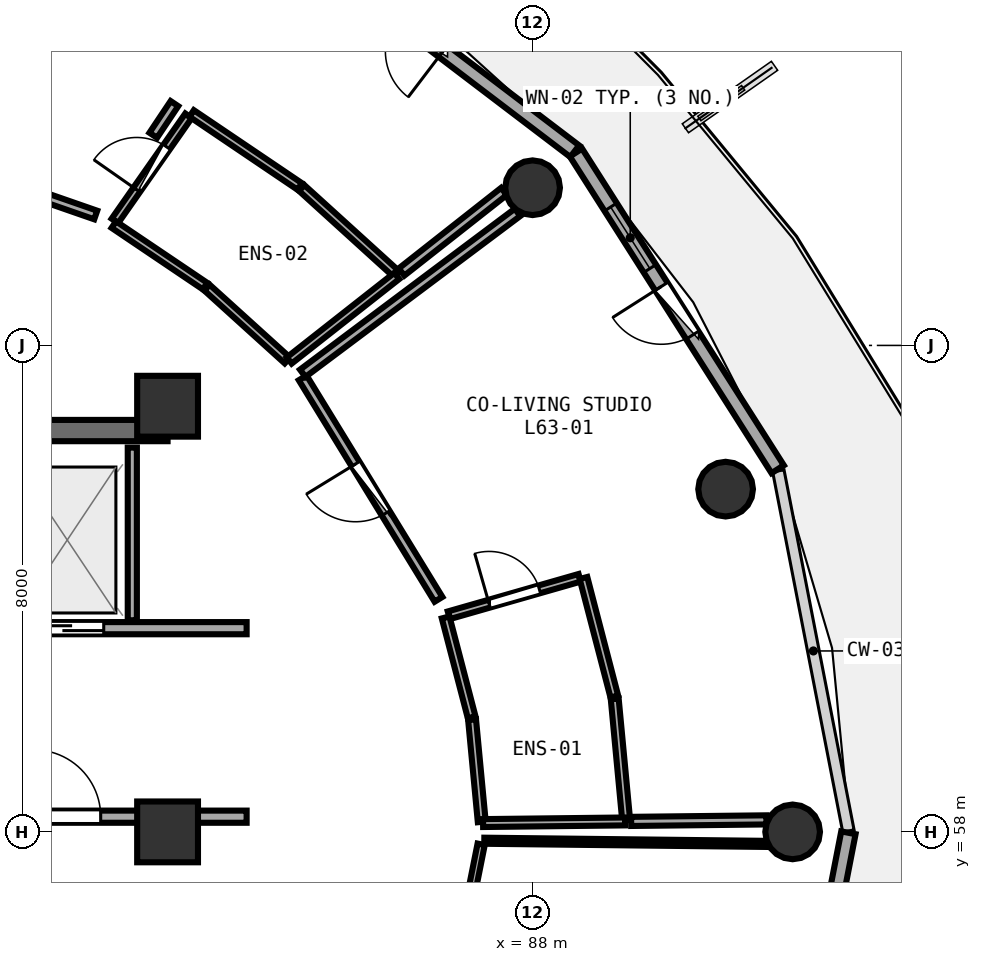
"""IFC4 building model, lengths in metres.
Left out: names, types, materials, properties, quantities, classifications, styles, units other than length and angle.
Written with IfcOpenShell. Run it as: python <this file> out.ifc"""

import sys

from ifc_helpers import new_model, si_unit, direction, frame, frame_2d, origin, origin_2d, place, context, subcontext, project, spatial, rectangle, circle, extrude, element, fill, save


model = new_model("IFC4")
c1 = context("Model", 3, precision=1e-05, world=origin(), true_north=direction((0.0, 1.0)))
c2 = subcontext(c1, "Body", "Model", "MODEL_VIEW")
j1 = project(units=[si_unit("LENGTHUNIT", "METRE"), si_unit("PLANEANGLEUNIT", "RADIAN")], contexts=[c1])
p1 = place(None, origin())
s1 = spatial("IfcSite", under=j1, at=p1, CompositionType="ELEMENT")
p2 = place(p1, origin())
s2 = spatial("IfcBuilding", under=s1, at=p2, CompositionType="ELEMENT")
p3 = place(p2, frame((0.0, 0.0, 248.7)))
s3 = spatial("IfcBuildingStorey", under=s2, at=p3, CompositionType="ELEMENT", Elevation=248.7)
for number, where, z_axis, x_axis in (
    (1, (82.0, 58.0, 0.0), (0.0, 0.0, 1.0), (1.0, 0.0, 0.0)),
    (2, (82.0, 65.0, 0.0), (0.0, 0.0, 1.0), (1.0, 0.0, 0.0)),
):
    element("IfcColumn", number, at=place(p3, frame(where, z_axis=z_axis, x_axis=x_axis)), inside=s3, PredefinedType="PILASTER", context=c2, shape_type="SweptSolid", body=[
        extrude(rectangle(XDim=1.0, YDim=1.0, at=origin_2d()), origin(), (0.0, 0.0, 1.0), 3.75),
    ])
for number, where, z_axis, x_axis in (
    (3, (92.28, 58.0, 0.0), (0.0, 0.0, 1.0), (1.0, 0.0, 0.0)),
    (4, (91.177, 63.636, 0.0), (0.0, 0.0, 1.0), (1.0, 0.0, 0.0)),
    (5, (88.003, 68.593, 0.0), (0.0, 0.0, 1.0), (1.0, 0.0, 0.0)),
):
    element("IfcColumn", number, at=place(p3, frame(where, z_axis=z_axis, x_axis=x_axis)), inside=s3, PredefinedType="COLUMN", context=c2, shape_type="SweptSolid", body=[
        extrude(circle(Radius=0.45, at=origin_2d()), origin(), (0.0, 0.0, 1.0), 3.75),
    ])
p4 = place(p3, frame((92.034, 63.964, 0.0), z_axis=(0.0, 0.0, 1.0), x_axis=(-0.537271968456, 0.843409053728, 0.0)))
e6 = element("IfcWall", 6, at=p4, inside=s3, PredefinedType="SOLIDWALL", context=c2, shape_type="SweptSolid", body=[
    extrude(rectangle(XDim=6.175, YDim=0.24, at=frame_2d((3.087, 0.0))), origin(), (0.0, 0.0, 1.0), 3.475),
])
p5 = place(p4, frame((2.613, 0.0, 0.0)))
e7 = element("IfcOpeningElement", 7, at=p5, cuts=e6, PredefinedType="OPENING", context=c2, shape_type="SweptSolid", body=[
    extrude(rectangle(XDim=0.95, YDim=2.1, at=frame_2d((0.475, 1.05))), frame((0.0, 0.13, 0.0), z_axis=(0.0, -1.0, 0.0), x_axis=(1.0, 0.0, 0.0)), (0.0, 0.0, 1.0), 0.26),
])
p6 = place(p4, frame((3.913, 0.0, 0.85)))
e8 = element("IfcOpeningElement", 8, at=p6, cuts=e6, PredefinedType="OPENING", context=c2, shape_type="SweptSolid", body=[
    extrude(rectangle(XDim=1.2, YDim=1.45, at=frame_2d((0.6, 0.725))), frame((0.0, 0.13, 0.0), z_axis=(0.0, -1.0, 0.0), x_axis=(1.0, 0.0, 0.0)), (0.0, 0.0, 1.0), 0.26),
])
p7 = place(p3, frame((88.696, 69.194, 0.0), z_axis=(0.0, 0.0, 1.0), x_axis=(-0.796010444211, 0.605282886514, 0.0)))
e9 = element("IfcWall", 9, at=p7, inside=s3, PredefinedType="SOLIDWALL", context=c2, shape_type="SweptSolid", body=[
    extrude(rectangle(XDim=6.387, YDim=0.24, at=frame_2d((3.194, 0.0))), origin(), (0.0, 0.0, 1.0), 3.475),
])
p8 = place(p7, frame((2.719, 0.0, 0.0)))
e10 = element("IfcOpeningElement", 10, at=p8, cuts=e9, PredefinedType="OPENING", context=c2, shape_type="SweptSolid", body=[
    extrude(rectangle(XDim=0.95, YDim=2.1, at=frame_2d((0.475, 1.05))), frame((0.0, 0.13, 0.0), z_axis=(0.0, -1.0, 0.0), x_axis=(1.0, 0.0, 0.0)), (0.0, 0.0, 1.0), 0.26),
])
p9 = place(p7, frame((4.019, 0.0, 0.85)))
e11 = element("IfcOpeningElement", 11, at=p9, cuts=e9, PredefinedType="OPENING", context=c2, shape_type="SweptSolid", body=[
    extrude(rectangle(XDim=1.2, YDim=1.45, at=frame_2d((0.6, 0.725))), frame((0.0, 0.13, 0.0), z_axis=(0.0, -1.0, 0.0), x_axis=(1.0, 0.0, 0.0)), (0.0, 0.0, 1.0), 0.26),
])
p10 = place(p3, frame((92.045, 52.063, 0.0), z_axis=(0.0, 0.0, 1.0), x_axis=(0.190969309115, 0.981596008028, 0.0)))
e12 = element("IfcWall", 12, at=p10, inside=s3, PredefinedType="SOLIDWALL", context=c2, shape_type="SweptSolid", body=[
    extrude(rectangle(XDim=6.033, YDim=0.24, at=frame_2d((3.017, 0.0))), origin(), (0.0, 0.0, 1.0), 3.475),
])
p11 = place(p10, frame((2.216, 0.0, 0.85)))
e13 = element("IfcOpeningElement", 13, at=p11, cuts=e12, PredefinedType="OPENING", context=c2, shape_type="SweptSolid", body=[
    extrude(rectangle(XDim=1.6, YDim=1.45, at=frame_2d((0.8, 0.725))), frame((0.0, 0.13, 0.0), z_axis=(0.0, -1.0, 0.0), x_axis=(1.0, 0.0, 0.0)), (0.0, 0.0, 1.0), 0.26),
])
p12 = place(p3, frame((74.0, 64.6, 0.0), z_axis=(0.0, 0.0, 1.0), x_axis=(1.0, 0.0, 0.0)))
e14 = element("IfcWall", 14, at=p12, inside=s3, PredefinedType="SHEAR", context=c2, shape_type="SweptSolid", body=[
    extrude(rectangle(XDim=8.0, YDim=0.35, at=frame_2d((4.0, 0.0))), origin(), (0.0, 0.0, 1.0), 3.49),
])
p13 = place(p3, frame((79.3, 61.35, 0.0), z_axis=(0.0, 0.0, 1.0), x_axis=(1.0, 0.0, 0.0)))
e15 = element("IfcWall", 15, at=p13, inside=s3, PredefinedType="SOLIDWALL", context=c2, shape_type="SweptSolid", body=[
    extrude(rectangle(XDim=4.0, YDim=0.2, at=frame_2d((2.0, 0.0))), origin(), (0.0, 0.0, 1.0), 2.775),
])
p14 = place(p13, frame((0.45, 0.0, 0.0)))
e16 = element("IfcOpeningElement", 16, at=p14, cuts=e15, PredefinedType="OPENING", context=c2, shape_type="SweptSolid", body=[
    extrude(rectangle(XDim=1.2, YDim=2.15, at=frame_2d((0.6, 1.075))), frame((0.0, 0.11, 0.0), z_axis=(0.0, -1.0, 0.0), x_axis=(1.0, 0.0, 0.0)), (0.0, 0.0, 1.0), 0.22),
])
p15 = place(p3, frame((81.42, 61.48, 0.0), z_axis=(0.0, 0.0, 1.0), x_axis=(0.0, 1.0, 0.0)))
e17 = element("IfcWall", 17, at=p15, inside=s3, PredefinedType="PARTITIONING", context=c2, shape_type="SweptSolid", body=[
    extrude(rectangle(XDim=2.84, YDim=0.15, at=frame_2d((1.42, 0.0))), origin(), (0.0, 0.0, 1.0), 3.48),
])
p16 = place(p3, frame((79.3, 58.25, 0.0), z_axis=(0.0, 0.0, 1.0), x_axis=(1.0, 0.0, 0.0)))
e18 = element("IfcWall", 18, at=p16, inside=s3, PredefinedType="SOLIDWALL", context=c2, shape_type="SweptSolid", body=[
    extrude(rectangle(XDim=4.0, YDim=0.2, at=frame_2d((2.0, 0.0))), origin(), (0.0, 0.0, 1.0), 2.775),
])
p17 = place(p16, frame((0.5, 0.0, 0.0)))
e19 = element("IfcOpeningElement", 19, at=p17, cuts=e18, PredefinedType="OPENING", context=c2, shape_type="SweptSolid", body=[
    extrude(rectangle(XDim=1.1, YDim=2.1, at=frame_2d((0.55, 1.05))), frame((0.0, 0.11, 0.0), z_axis=(0.0, -1.0, 0.0), x_axis=(1.0, 0.0, 0.0)), (0.0, 0.0, 1.0), 0.22),
])
p18 = place(p3, frame((86.626, 61.562, 0.0), z_axis=(0.0, 0.0, 1.0), x_axis=(0.961379738838, 0.275225358117, 0.0)))
e20 = element("IfcWall", 20, at=p18, inside=s3, PredefinedType="PLUMBINGWALL", context=c2, shape_type="SweptSolid", body=[
    extrude(rectangle(XDim=2.238, YDim=0.13, at=frame_2d((1.119, 0.0))), origin(), (0.0, 0.0, 1.0), 3.175),
])
p19 = place(p18, frame((0.689, 0.0, 0.0)))
e21 = element("IfcOpeningElement", 21, at=p19, cuts=e20, PredefinedType="OPENING", context=c2, shape_type="SweptSolid", body=[
    extrude(rectangle(XDim=0.86, YDim=2.05, at=frame_2d((0.43, 1.025))), frame((0.0, 0.075, 0.0), z_axis=(0.0, -1.0, 0.0), x_axis=(1.0, 0.0, 0.0)), (0.0, 0.0, 1.0), 0.15),
])
p20 = place(p3, frame((86.456, 61.824, 0.0), z_axis=(0.0, 0.0, 1.0), x_axis=(-0.522665227064, 0.852538011128, 0.0)))
e22 = element("IfcWall", 22, at=p20, inside=s3, PredefinedType="PARTITIONING", context=c2, shape_type="SweptSolid", body=[
    extrude(rectangle(XDim=4.273, YDim=0.15, at=frame_2d((2.136, 0.0))), origin(), (0.0, 0.0, 1.0), 3.075),
])
p21 = place(p20, frame((1.661, 0.0, 0.0)))
e23 = element("IfcOpeningElement", 23, at=p21, cuts=e22, PredefinedType="OPENING", context=c2, shape_type="SweptSolid", body=[
    extrude(rectangle(XDim=0.95, YDim=2.08, at=frame_2d((0.475, 1.04))), frame((0.0, 0.085, 0.0), z_axis=(0.0, -1.0, 0.0), x_axis=(1.0, 0.0, 0.0)), (0.0, 0.0, 1.0), 0.17),
])
p22 = place(p3, frame((81.133, 68.047, 0.0), z_axis=(0.0, 0.0, 1.0), x_axis=(0.573578732096, 0.819150436787, 0.0)))
e24 = element("IfcWall", 24, at=p22, inside=s3, PredefinedType="PLUMBINGWALL", context=c2, shape_type="SweptSolid", body=[
    extrude(rectangle(XDim=2.112, YDim=0.13, at=frame_2d((1.056, 0.0))), origin(), (0.0, 0.0, 1.0), 3.175),
])
p23 = place(p22, frame((0.626, 0.0, 0.0)))
e25 = element("IfcOpeningElement", 25, at=p23, cuts=e24, PredefinedType="OPENING", context=c2, shape_type="SweptSolid", body=[
    extrude(rectangle(XDim=0.86, YDim=2.05, at=frame_2d((0.43, 1.025))), frame((0.0, 0.075, 0.0), z_axis=(0.0, -1.0, 0.0), x_axis=(1.0, 0.0, 0.0)), (0.0, 0.0, 1.0), 0.15),
])
p24 = place(p3, frame((80.818, 68.145, 0.0), z_axis=(0.0, 0.0, 1.0), x_axis=(-0.944627899296, 0.328143462331, 0.0)))
e26 = element("IfcWall", 26, at=p24, inside=s3, PredefinedType="PARTITIONING", context=c2, shape_type="SweptSolid", body=[
    extrude(rectangle(XDim=4.57, YDim=0.15, at=frame_2d((2.285, 0.0))), origin(), (0.0, 0.0, 1.0), 3.48),
])
p25 = place(p24, frame((1.81, 0.0, 0.0)))
e27 = element("IfcOpeningElement", 27, at=p25, cuts=e26, PredefinedType="OPENING", context=c2, shape_type="SweptSolid", body=[
    extrude(rectangle(XDim=0.95, YDim=2.08, at=frame_2d((0.475, 1.04))), frame((0.0, 0.085, 0.0), z_axis=(0.0, -1.0, 0.0), x_axis=(1.0, 0.0, 0.0)), (0.0, 0.0, 1.0), 0.17),
])
p26 = place(p3, frame((86.411, 54.058, 0.0), z_axis=(0.0, 0.0, 1.0), x_axis=(0.195845174173, 0.980634828952, 0.0)))
e28 = element("IfcWall", 28, at=p26, inside=s3, PredefinedType="PARTITIONING", context=c2, shape_type="SweptSolid", body=[
    extrude(rectangle(XDim=3.812, YDim=0.12, at=frame_2d((1.906, 0.0))), origin(), (0.0, 0.0, 1.0), 3.48),
])
p27 = place(p26, frame((1.456, 0.0, 0.0)))
e29 = element("IfcOpeningElement", 29, at=p27, cuts=e28, PredefinedType="OPENING", context=c2, shape_type="SweptSolid", body=[
    extrude(rectangle(XDim=0.9, YDim=2.08, at=frame_2d((0.45, 1.04))), frame((0.0, 0.07, 0.0), z_axis=(0.0, -1.0, 0.0), x_axis=(1.0, 0.0, 0.0)), (0.0, 0.0, 1.0), 0.14),
])
p28 = place(p3, frame((87.167, 58.165, 0.0), z_axis=(0.0, 0.0, 1.0), x_axis=(-0.094303984979, 0.995543448784, 0.0)))
e30 = element("IfcWall", 30, at=p28, inside=s3, PredefinedType="PLUMBINGWALL", context=c2, shape_type="SweptSolid", body=[
    extrude(rectangle(XDim=1.688, YDim=0.13, at=frame_2d((0.844, 0.0))), origin(), (0.0, 0.0, 1.0), 3.075),
])
p29 = place(p3, frame((87.001, 59.885, 0.0), z_axis=(0.0, 0.0, 1.0), x_axis=(-0.252205193656, 0.967673777826, 0.0)))
e31 = element("IfcWall", 31, at=p29, inside=s3, PredefinedType="PLUMBINGWALL", context=c2, shape_type="SweptSolid", body=[
    extrude(rectangle(XDim=1.697, YDim=0.13, at=frame_2d((0.849, 0.0))), origin(), (0.0, 0.0, 1.0), 3.48),
])
p30 = place(p3, frame((88.84, 62.176, 0.0), z_axis=(0.0, 0.0, 1.0), x_axis=(0.251652018774, -0.967817783184, 0.0)))
e32 = element("IfcWall", 32, at=p30, inside=s3, PredefinedType="PLUMBINGWALL", context=c2, shape_type="SweptSolid", body=[
    extrude(rectangle(XDim=2.014, YDim=0.13, at=frame_2d((1.007, 0.0))), origin(), (0.0, 0.0, 1.0), 3.48),
])
p31 = place(p3, frame((89.354, 60.187, 0.0), z_axis=(0.0, 0.0, 1.0), x_axis=(0.09380867442, -0.995590243325, 0.0)))
e33 = element("IfcWall", 33, at=p31, inside=s3, PredefinedType="PLUMBINGWALL", context=c2, shape_type="SweptSolid", body=[
    extrude(rectangle(XDim=2.004, YDim=0.13, at=frame_2d((1.002, 0.0))), origin(), (0.0, 0.0, 1.0), 3.48),
])
p32 = place(p3, frame((89.524, 58.172, 0.0), z_axis=(0.0, 0.0, 1.0), x_axis=(-0.999935061604, -0.011396164964, 0.0)))
e34 = element("IfcWall", 34, at=p32, inside=s3, PredefinedType="PLUMBINGWALL", context=c2, shape_type="SweptSolid", body=[
    extrude(rectangle(XDim=2.335, YDim=0.13, at=frame_2d((1.167, 0.0))), origin(), (0.0, 0.0, 1.0), 3.075),
])
p33 = place(p3, frame((84.223, 65.542, 0.0), z_axis=(0.0, 0.0, 1.0), x_axis=(0.800384816546, 0.599486568191, 0.0)))
e35 = element("IfcWall", 35, at=p33, inside=s3, PredefinedType="PARTITIONING", context=c2, shape_type="SweptSolid", body=[
    extrude(rectangle(XDim=4.414, YDim=0.15, at=frame_2d((2.207, 0.0))), origin(), (0.0, 0.0, 1.0), 3.175),
])
p34 = place(p3, frame((91.848, 58.198, 0.0), z_axis=(0.0, 0.0, 1.0), x_axis=(-0.999936076373, -0.011306775263, 0.0)))
e36 = element("IfcWall", 36, at=p34, inside=s3, PredefinedType="PARTITIONING", context=c2, shape_type="SweptSolid", body=[
    extrude(rectangle(XDim=2.224, YDim=0.15, at=frame_2d((1.112, 0.0))), origin(), (0.0, 0.0, 1.0), 3.075),
])
p35 = place(p3, frame((83.97, 65.753, 0.0), z_axis=(0.0, 0.0, 1.0), x_axis=(-0.741337974143, 0.671131885767, 0.0)))
e37 = element("IfcWall", 37, at=p35, inside=s3, PredefinedType="PLUMBINGWALL", context=c2, shape_type="SweptSolid", body=[
    extrude(rectangle(XDim=1.784, YDim=0.13, at=frame_2d((0.892, 0.0))), origin(), (0.0, 0.0, 1.0), 3.075),
])
p36 = place(p3, frame((82.616, 66.975, 0.0), z_axis=(0.0, 0.0, 1.0), x_axis=(-0.82921750612, 0.558926048367, 0.0)))
e38 = element("IfcWall", 38, at=p36, inside=s3, PredefinedType="PLUMBINGWALL", context=c2, shape_type="SweptSolid", body=[
    extrude(rectangle(XDim=1.81, YDim=0.13, at=frame_2d((0.905, 0.0))), origin(), (0.0, 0.0, 1.0), 3.075),
])
p37 = place(p3, frame((82.396, 69.815, 0.0), z_axis=(0.0, 0.0, 1.0), x_axis=(0.828761584291, -0.559601855254, 0.0)))
e39 = element("IfcWall", 39, at=p37, inside=s3, PredefinedType="PLUMBINGWALL", context=c2, shape_type="SweptSolid", body=[
    extrude(rectangle(XDim=2.145, YDim=0.13, at=frame_2d((1.073, 0.0))), origin(), (0.0, 0.0, 1.0), 3.075),
])
p38 = place(p3, frame((84.205, 68.59, 0.0), z_axis=(0.0, 0.0, 1.0), x_axis=(0.740404918602, -0.672161109043, 0.0)))
e40 = element("IfcWall", 40, at=p38, inside=s3, PredefinedType="PLUMBINGWALL", context=c2, shape_type="SweptSolid", body=[
    extrude(rectangle(XDim=2.114, YDim=0.13, at=frame_2d((1.057, 0.0))), origin(), (0.0, 0.0, 1.0), 3.075),
])
p39 = place(p3, frame((85.769, 67.143, 0.0), z_axis=(0.0, 0.0, 1.0), x_axis=(-0.786197810061, -0.617974921381, 0.0)))
e41 = element("IfcWall", 41, at=p39, inside=s3, PredefinedType="PLUMBINGWALL", context=c2, shape_type="SweptSolid", body=[
    extrude(rectangle(XDim=2.25, YDim=0.13, at=frame_2d((1.125, 0.0))), origin(), (0.0, 0.0, 1.0), 3.075),
])
p40 = place(p3, frame((87.532, 68.533, 0.0), z_axis=(0.0, 0.0, 1.0), x_axis=(-0.785832073147, -0.618439934685, 0.0)))
e42 = element("IfcWall", 42, at=p40, inside=s3, PredefinedType="PARTITIONING", context=c2, shape_type="SweptSolid", body=[
    extrude(rectangle(XDim=2.144, YDim=0.15, at=frame_2d((1.072, 0.0))), origin(), (0.0, 0.0, 1.0), 3.075),
])
p41 = place(p3, frame((82.113, 69.977, 0.0), z_axis=(0.0, 0.0, 1.0), x_axis=(-0.555598996852, -0.831450392204, 0.0)))
e43 = element("IfcWall", 43, at=p41, inside=s3, PredefinedType="PARTITIONING", context=c2, shape_type="SweptSolid", body=[
    extrude(rectangle(XDim=0.627, YDim=0.15, at=frame_2d((0.313, 0.0))), origin(), (0.0, 0.0, 1.0), 3.175),
])
p42 = place(p3, frame((87.209, 57.854, 0.0), z_axis=(0.0, 0.0, 1.0), x_axis=(0.999937174585, -0.01120923205, 0.0)))
e44 = element("IfcWall", 44, at=p42, inside=s3, PredefinedType="PARTITIONING", context=c2, shape_type="SweptSolid", body=[
    extrude(rectangle(XDim=4.639, YDim=0.1, at=frame_2d((2.32, 0.0))), origin(), (0.0, 0.0, 1.0), 3.075),
])
p43 = place(p5, frame((0.95, 0.0, 0.0), z_axis=(0.0, 0.0, 1.0), x_axis=(-1.0, 0.0, 0.0)))
e45 = element("IfcDoor", 45, at=p43, inside=s3, OperationType="SINGLE_SWING_LEFT", PredefinedType="DOOR", context=c2, shape_type="SweptSolid", body=[
    extrude(rectangle(XDim=0.95, YDim=2.1, at=frame_2d((0.475, 1.05))), frame((0.0, 0.025, 0.0), z_axis=(0.0, -1.0, 0.0), x_axis=(1.0, 0.0, 0.0)), (0.0, 0.0, 1.0), 0.05),
])
fill(e7, e45)
p44 = place(p6, origin())
e46 = element("IfcWindow", 46, at=p44, inside=s3, PartitioningType="SINGLE_PANEL", PredefinedType="WINDOW", context=c2, shape_type="SweptSolid", body=[
    extrude(rectangle(XDim=1.2, YDim=1.45, at=frame_2d((0.6, 0.725))), frame((0.0, 0.03, 0.0), z_axis=(0.0, -1.0, 0.0), x_axis=(1.0, 0.0, 0.0)), (0.0, 0.0, 1.0), 0.06),
])
fill(e8, e46)
p45 = place(p8, frame((0.95, 0.0, 0.0), z_axis=(0.0, 0.0, 1.0), x_axis=(-1.0, 0.0, 0.0)))
e47 = element("IfcDoor", 47, at=p45, inside=s3, OperationType="SINGLE_SWING_RIGHT", PredefinedType="DOOR", context=c2, shape_type="SweptSolid", body=[
    extrude(rectangle(XDim=0.95, YDim=2.1, at=frame_2d((0.475, 1.05))), frame((0.0, 0.025, 0.0), z_axis=(0.0, -1.0, 0.0), x_axis=(1.0, 0.0, 0.0)), (0.0, 0.0, 1.0), 0.05),
])
fill(e10, e47)
p46 = place(p14, origin())
e48 = element("IfcDoor", 48, at=p46, inside=s3, OperationType="DOUBLE_DOOR_SLIDING", PredefinedType="DOOR", context=c2, shape_type="SweptSolid", body=[
    extrude(rectangle(XDim=1.2, YDim=2.15, at=frame_2d((0.6, 1.075))), frame((0.0, 0.025, 0.0), z_axis=(0.0, -1.0, 0.0), x_axis=(1.0, 0.0, 0.0)), (0.0, 0.0, 1.0), 0.05),
])
fill(e16, e48)
p47 = place(p17, frame((1.1, 0.0, 0.0), z_axis=(0.0, 0.0, 1.0), x_axis=(-1.0, 0.0, 0.0)))
e49 = element("IfcDoor", 49, at=p47, inside=s3, OperationType="SINGLE_SWING_RIGHT", PredefinedType="DOOR", context=c2, shape_type="SweptSolid", body=[
    extrude(rectangle(XDim=1.1, YDim=2.1, at=frame_2d((0.55, 1.05))), frame((0.0, 0.025, 0.0), z_axis=(0.0, -1.0, 0.0), x_axis=(1.0, 0.0, 0.0)), (0.0, 0.0, 1.0), 0.05),
])
fill(e19, e49)
p48 = place(p19, origin())
e50 = element("IfcDoor", 50, at=p48, inside=s3, OperationType="SINGLE_SWING_LEFT", PredefinedType="DOOR", context=c2, shape_type="SweptSolid", body=[
    extrude(rectangle(XDim=0.86, YDim=2.05, at=frame_2d((0.43, 1.025))), frame((0.0, 0.025, 0.0), z_axis=(0.0, -1.0, 0.0), x_axis=(1.0, 0.0, 0.0)), (0.0, 0.0, 1.0), 0.05),
])
fill(e21, e50)
p49 = place(p21, origin())
e51 = element("IfcDoor", 51, at=p49, inside=s3, OperationType="SINGLE_SWING_RIGHT", PredefinedType="DOOR", context=c2, shape_type="SweptSolid", body=[
    extrude(rectangle(XDim=0.95, YDim=2.08, at=frame_2d((0.475, 1.04))), frame((0.0, 0.025, 0.0), z_axis=(0.0, -1.0, 0.0), x_axis=(1.0, 0.0, 0.0)), (0.0, 0.0, 1.0), 0.05),
])
fill(e23, e51)
p50 = place(p23, origin())
e52 = element("IfcDoor", 52, at=p50, inside=s3, OperationType="SINGLE_SWING_LEFT", PredefinedType="DOOR", context=c2, shape_type="SweptSolid", body=[
    extrude(rectangle(XDim=0.86, YDim=2.05, at=frame_2d((0.43, 1.025))), frame((0.0, 0.025, 0.0), z_axis=(0.0, -1.0, 0.0), x_axis=(1.0, 0.0, 0.0)), (0.0, 0.0, 1.0), 0.05),
])
fill(e25, e52)
save(model, sys.argv[1])
